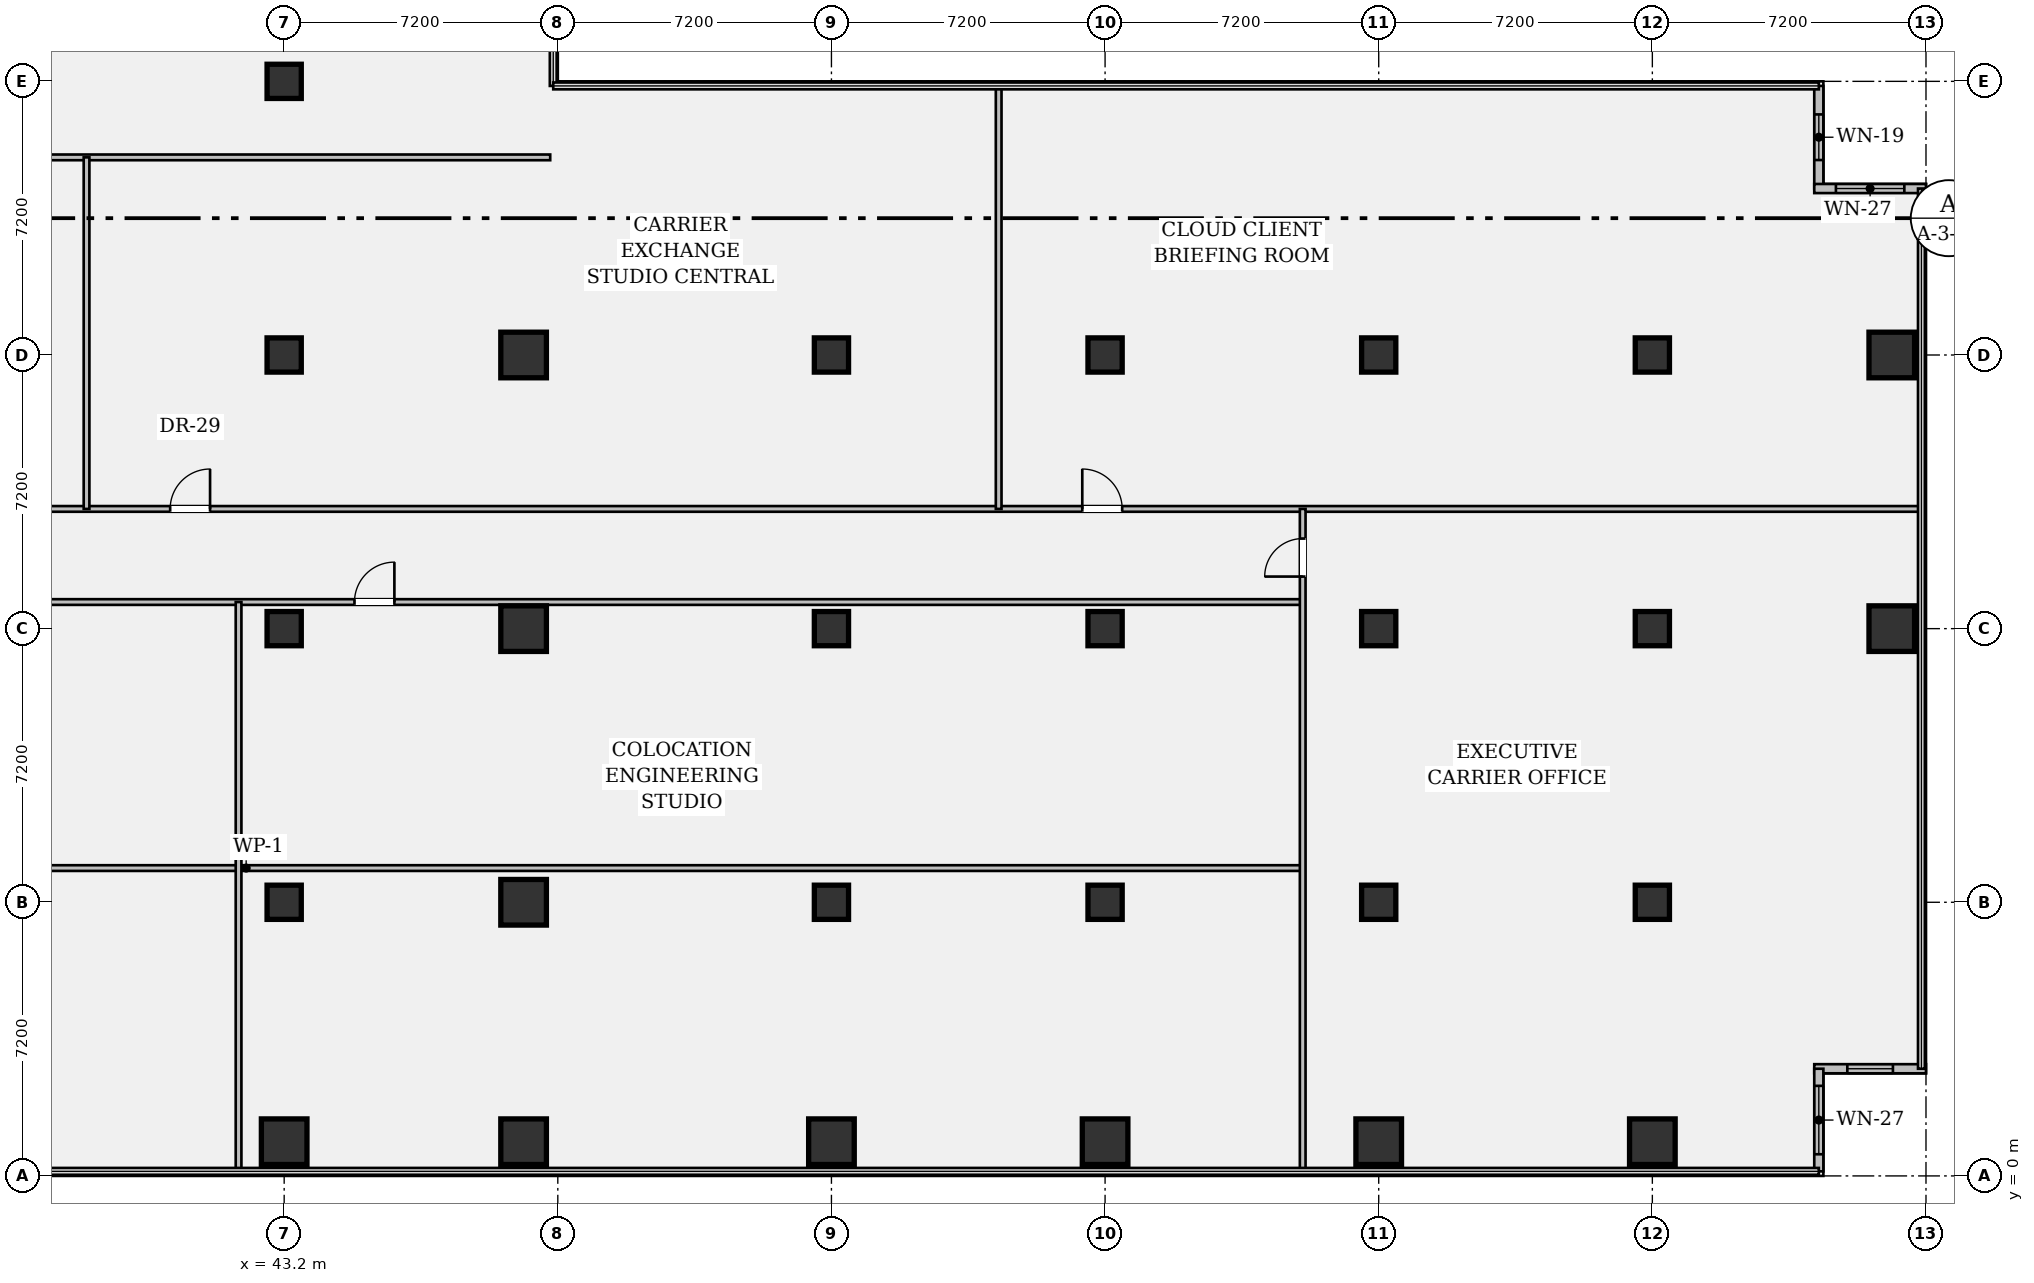
"""IFC4 building model, lengths in metres.
Left out: names, types, materials, properties, quantities, classifications, styles, units other than length and angle.
Written with IfcOpenShell. Run it as: python <this file> out.ifc"""

import sys

from ifc_helpers import new_model, si_unit, direction, frame, frame_2d, origin, origin_2d, place, context, subcontext, project, spatial, rectangle, hollow_rectangle, extrude, element, fill, save


model = new_model("IFC4")
c1 = context("Model", 3, precision=1e-05, world=origin(), true_north=direction((0.0, 1.0)))
c2 = subcontext(c1, "Body", "Model", "MODEL_VIEW")
j1 = project(units=[si_unit("LENGTHUNIT", "METRE"), si_unit("PLANEANGLEUNIT", "RADIAN")], contexts=[c1])
p1 = place(None, origin())
s1 = spatial("IfcSite", under=j1, at=p1, CompositionType="ELEMENT")
p2 = place(p1, origin())
s2 = spatial("IfcBuilding", under=s1, at=p2, CompositionType="ELEMENT")
p3 = place(p2, frame((0.0, 0.0, 9.45)))
s3 = spatial("IfcBuildingStorey", under=s2, at=p3, CompositionType="ELEMENT", Elevation=9.45)
p4 = place(p3, frame((43.2, 0.9, 0.0), z_axis=(0.0, 0.0, 1.0), x_axis=(1.0, 0.0, 0.0)))
e1 = element("IfcColumn", 1, at=p4, inside=s3, PredefinedType="COLUMN", context=c2, shape_type="SweptSolid", body=[
    extrude(hollow_rectangle(XDim=1.2, YDim=1.2, WallThickness=0.075, at=origin_2d()), origin(), (0.0, 0.0, 1.0), 3.9),
])
for number, where, z_axis, x_axis in (
    (2, (43.2, 7.2, 0.0), (0.0, 0.0, 1.0), (1.0, 0.0, 0.0)),
    (3, (43.2, 14.4, 0.0), (0.0, 0.0, 1.0), (1.0, 0.0, 0.0)),
    (4, (43.2, 21.6, 0.0), (0.0, 0.0, 1.0), (1.0, 0.0, 0.0)),
    (5, (43.2, 28.8, 0.0), (0.0, 0.0, 1.0), (1.0, 0.0, 0.0)),
):
    element("IfcColumn", number, at=place(p3, frame(where, z_axis=z_axis, x_axis=x_axis)), inside=s3, PredefinedType="COLUMN", context=c2, shape_type="SweptSolid", body=[
        extrude(rectangle(XDim=0.9, YDim=0.9, at=origin_2d()), origin(), (0.0, 0.0, 1.0), 3.9),
    ])
for number, where, z_axis, x_axis in (
    (6, (49.5, 0.9, 0.0), (0.0, 0.0, 1.0), (1.0, 0.0, 0.0)),
    (7, (49.5, 7.2, 0.0), (0.0, 0.0, 1.0), (1.0, 0.0, 0.0)),
    (8, (49.5, 14.4, 0.0), (0.0, 0.0, 1.0), (1.0, 0.0, 0.0)),
    (9, (49.5, 21.6, 0.0), (0.0, 0.0, 1.0), (1.0, 0.0, 0.0)),
    (10, (57.6, 0.9, 0.0), (0.0, 0.0, 1.0), (1.0, 0.0, 0.0)),
):
    element("IfcColumn", number, at=place(p3, frame(where, z_axis=z_axis, x_axis=x_axis)), inside=s3, PredefinedType="COLUMN", context=c2, shape_type="SweptSolid", body=[
        extrude(hollow_rectangle(XDim=1.2, YDim=1.2, WallThickness=0.075, at=origin_2d()), origin(), (0.0, 0.0, 1.0), 3.9),
    ])
for number, where, z_axis, x_axis in (
    (11, (57.6, 7.2, 0.0), (0.0, 0.0, 1.0), (1.0, 0.0, 0.0)),
    (12, (57.6, 14.4, 0.0), (0.0, 0.0, 1.0), (1.0, 0.0, 0.0)),
    (13, (57.6, 21.6, 0.0), (0.0, 0.0, 1.0), (1.0, 0.0, 0.0)),
):
    element("IfcColumn", number, at=place(p3, frame(where, z_axis=z_axis, x_axis=x_axis)), inside=s3, PredefinedType="COLUMN", context=c2, shape_type="SweptSolid", body=[
        extrude(rectangle(XDim=0.9, YDim=0.9, at=origin_2d()), origin(), (0.0, 0.0, 1.0), 3.9),
    ])
p5 = place(p3, frame((64.8, 0.9, 0.0), z_axis=(0.0, 0.0, 1.0), x_axis=(1.0, 0.0, 0.0)))
e14 = element("IfcColumn", 14, at=p5, inside=s3, PredefinedType="COLUMN", context=c2, shape_type="SweptSolid", body=[
    extrude(hollow_rectangle(XDim=1.2, YDim=1.2, WallThickness=0.075, at=origin_2d()), origin(), (0.0, 0.0, 1.0), 3.9),
])
for number, where, z_axis, x_axis in (
    (15, (64.8, 7.2, 0.0), (0.0, 0.0, 1.0), (1.0, 0.0, 0.0)),
    (16, (64.8, 14.4, 0.0), (0.0, 0.0, 1.0), (1.0, 0.0, 0.0)),
    (17, (64.8, 21.6, 0.0), (0.0, 0.0, 1.0), (1.0, 0.0, 0.0)),
):
    element("IfcColumn", number, at=place(p3, frame(where, z_axis=z_axis, x_axis=x_axis)), inside=s3, PredefinedType="COLUMN", context=c2, shape_type="SweptSolid", body=[
        extrude(rectangle(XDim=0.9, YDim=0.9, at=origin_2d()), origin(), (0.0, 0.0, 1.0), 3.9),
    ])
p6 = place(p3, frame((72.0, 0.9, 0.0), z_axis=(0.0, 0.0, 1.0), x_axis=(1.0, 0.0, 0.0)))
e18 = element("IfcColumn", 18, at=p6, inside=s3, PredefinedType="COLUMN", context=c2, shape_type="SweptSolid", body=[
    extrude(hollow_rectangle(XDim=1.2, YDim=1.2, WallThickness=0.075, at=origin_2d()), origin(), (0.0, 0.0, 1.0), 3.9),
])
for number, where, z_axis, x_axis in (
    (19, (72.0, 7.2, 0.0), (0.0, 0.0, 1.0), (1.0, 0.0, 0.0)),
    (20, (72.0, 14.4, 0.0), (0.0, 0.0, 1.0), (1.0, 0.0, 0.0)),
    (21, (72.0, 21.6, 0.0), (0.0, 0.0, 1.0), (1.0, 0.0, 0.0)),
):
    element("IfcColumn", number, at=place(p3, frame(where, z_axis=z_axis, x_axis=x_axis)), inside=s3, PredefinedType="COLUMN", context=c2, shape_type="SweptSolid", body=[
        extrude(rectangle(XDim=0.9, YDim=0.9, at=origin_2d()), origin(), (0.0, 0.0, 1.0), 3.9),
    ])
p7 = place(p3, frame((79.2, 0.9, 0.0), z_axis=(0.0, 0.0, 1.0), x_axis=(1.0, 0.0, 0.0)))
e22 = element("IfcColumn", 22, at=p7, inside=s3, PredefinedType="COLUMN", context=c2, shape_type="SweptSolid", body=[
    extrude(hollow_rectangle(XDim=1.2, YDim=1.2, WallThickness=0.075, at=origin_2d()), origin(), (0.0, 0.0, 1.0), 3.9),
])
for number, where, z_axis, x_axis in (
    (23, (79.2, 7.2, 0.0), (0.0, 0.0, 1.0), (1.0, 0.0, 0.0)),
    (24, (79.2, 14.4, 0.0), (0.0, 0.0, 1.0), (1.0, 0.0, 0.0)),
    (25, (79.2, 21.6, 0.0), (0.0, 0.0, 1.0), (1.0, 0.0, 0.0)),
):
    element("IfcColumn", number, at=place(p3, frame(where, z_axis=z_axis, x_axis=x_axis)), inside=s3, PredefinedType="COLUMN", context=c2, shape_type="SweptSolid", body=[
        extrude(rectangle(XDim=0.9, YDim=0.9, at=origin_2d()), origin(), (0.0, 0.0, 1.0), 3.9),
    ])
for number, where, z_axis, x_axis in (
    (26, (85.5, 14.4, 0.0), (0.0, 0.0, 1.0), (1.0, 0.0, 0.0)),
    (27, (85.5, 21.6, 0.0), (0.0, 0.0, 1.0), (1.0, 0.0, 0.0)),
):
    element("IfcColumn", number, at=place(p3, frame(where, z_axis=z_axis, x_axis=x_axis)), inside=s3, PredefinedType="COLUMN", context=c2, shape_type="SweptSolid", body=[
        extrude(hollow_rectangle(XDim=1.2, YDim=1.2, WallThickness=0.075, at=origin_2d()), origin(), (0.0, 0.0, 1.0), 3.9),
    ])
p8 = place(p3, frame((83.58, 28.68, 0.0), z_axis=(0.0, 0.0, 1.0), x_axis=(0.0, -1.0, 0.0)))
e28 = element("IfcWall", 28, at=p8, inside=s3, PredefinedType="STANDARD", context=c2, shape_type="SweptSolid", body=[
    extrude(rectangle(XDim=2.7, YDim=0.24, at=frame_2d((1.35, 0.0))), origin(), (0.0, 0.0, 1.0), 3.9),
])
p9 = place(p8, frame((0.75, 0.0, 0.95)))
e29 = element("IfcOpeningElement", 29, at=p9, cuts=e28, PredefinedType="OPENING", context=c2, shape_type="SweptSolid", body=[
    extrude(rectangle(XDim=1.2, YDim=1.8, at=frame_2d((0.6, 0.9))), frame((0.0, 0.132, 0.0), z_axis=(0.0, -1.0, 0.0), x_axis=(1.0, 0.0, 0.0)), (0.0, 0.0, 1.0), 0.264),
])
p10 = place(p3, frame((83.46, 25.98, 0.0), z_axis=(0.0, 0.0, 1.0), x_axis=(1.0, 0.0, 0.0)))
e30 = element("IfcWall", 30, at=p10, inside=s3, PredefinedType="STANDARD", context=c2, shape_type="SweptSolid", body=[
    extrude(rectangle(XDim=2.94, YDim=0.24, at=frame_2d((1.47, 0.0))), origin(), (0.0, 0.0, 1.0), 3.9),
])
p11 = place(p10, frame((0.57, 0.0, 0.95)))
e31 = element("IfcOpeningElement", 31, at=p11, cuts=e30, PredefinedType="OPENING", context=c2, shape_type="SweptSolid", body=[
    extrude(rectangle(XDim=1.8, YDim=1.35, at=frame_2d((0.9, 0.675))), frame((0.0, 0.132, 0.0), z_axis=(0.0, -1.0, 0.0), x_axis=(1.0, 0.0, 0.0)), (0.0, 0.0, 1.0), 0.264),
])
p12 = place(p3, frame((86.4, 2.82, 0.0), z_axis=(0.0, 0.0, 1.0), x_axis=(-1.0, 0.0, 0.0)))
e32 = element("IfcWall", 32, at=p12, inside=s3, PredefinedType="STANDARD", context=c2, shape_type="SweptSolid", body=[
    extrude(rectangle(XDim=2.94, YDim=0.24, at=frame_2d((1.47, 0.0))), origin(), (0.0, 0.0, 1.0), 3.9),
])
p13 = place(p12, frame((0.87, 0.0, 0.95)))
e33 = element("IfcOpeningElement", 33, at=p13, cuts=e32, PredefinedType="OPENING", context=c2, shape_type="SweptSolid", body=[
    extrude(rectangle(XDim=1.2, YDim=1.8, at=frame_2d((0.6, 0.9))), frame((0.0, 0.132, 0.0), z_axis=(0.0, -1.0, 0.0), x_axis=(1.0, 0.0, 0.0)), (0.0, 0.0, 1.0), 0.264),
])
p14 = place(p3, frame((83.58, 2.82, 0.0), z_axis=(0.0, 0.0, 1.0), x_axis=(0.0, -1.0, 0.0)))
e34 = element("IfcWall", 34, at=p14, inside=s3, PredefinedType="STANDARD", context=c2, shape_type="SweptSolid", body=[
    extrude(rectangle(XDim=2.7, YDim=0.24, at=frame_2d((1.35, 0.0))), origin(), (0.0, 0.0, 1.0), 3.9),
])
p15 = place(p14, frame((0.45, 0.0, 0.95)))
e35 = element("IfcOpeningElement", 35, at=p15, cuts=e34, PredefinedType="OPENING", context=c2, shape_type="SweptSolid", body=[
    extrude(rectangle(XDim=1.8, YDim=1.35, at=frame_2d((0.9, 0.675))), frame((0.0, 0.132, 0.0), z_axis=(0.0, -1.0, 0.0), x_axis=(1.0, 0.0, 0.0)), (0.0, 0.0, 1.0), 0.264),
])
p16 = place(p3, frame((14.4, 8.1, 0.0), z_axis=(0.0, 0.0, 1.0), x_axis=(1.0, 0.0, 0.0)))
e36 = element("IfcWall", 36, at=p16, inside=s3, PredefinedType="PARTITIONING", context=c2, shape_type="SweptSolid", body=[
    extrude(rectangle(XDim=55.6, YDim=0.15, at=frame_2d((27.8, 0.0))), origin(), (0.0, 0.0, 1.0), 2.938),
])
p17 = place(p16, frame((1.1, 0.0, 0.0)))
e37 = element("IfcOpeningElement", 37, at=p17, cuts=e36, PredefinedType="OPENING", context=c2, shape_type="SweptSolid", body=[
    extrude(rectangle(XDim=1.0, YDim=2.15, at=frame_2d((0.5, 1.075))), frame((0.0, 0.087, 0.0), z_axis=(0.0, -1.0, 0.0), x_axis=(1.0, 0.0, 0.0)), (0.0, 0.0, 1.0), 0.174),
])
p18 = place(p3, frame((17.45, 15.1, 0.0), z_axis=(0.0, 0.0, 1.0), x_axis=(1.0, 0.0, 0.0)))
e38 = element("IfcWall", 38, at=p18, inside=s3, PredefinedType="PARTITIONING", context=c2, shape_type="SweptSolid", body=[
    extrude(rectangle(XDim=52.55, YDim=0.15, at=frame_2d((26.275, 0.0))), origin(), (0.0, 0.0, 1.0), 2.938),
])
p19 = place(p18, frame((5.2, 0.0, 0.0)))
e39 = element("IfcOpeningElement", 39, at=p19, cuts=e38, PredefinedType="OPENING", context=c2, shape_type="SweptSolid", body=[
    extrude(rectangle(XDim=1.05, YDim=2.15, at=frame_2d((0.525, 1.075))), frame((0.0, 0.087, 0.0), z_axis=(0.0, -1.0, 0.0), x_axis=(1.0, 0.0, 0.0)), (0.0, 0.0, 1.0), 0.174),
])
p20 = place(p18, frame((27.6, 0.0, 0.0)))
e40 = element("IfcOpeningElement", 40, at=p20, cuts=e38, PredefinedType="OPENING", context=c2, shape_type="SweptSolid", body=[
    extrude(rectangle(XDim=1.05, YDim=2.15, at=frame_2d((0.525, 1.075))), frame((0.0, 0.087, 0.0), z_axis=(0.0, -1.0, 0.0), x_axis=(1.0, 0.0, 0.0)), (0.0, 0.0, 1.0), 0.174),
])
p21 = place(p3, frame((17.45, 17.55, 0.0), z_axis=(0.0, 0.0, 1.0), x_axis=(1.0, 0.0, 0.0)))
e41 = element("IfcWall", 41, at=p21, inside=s3, PredefinedType="PARTITIONING", context=c2, shape_type="SweptSolid", body=[
    extrude(rectangle(XDim=68.83, YDim=0.15, at=frame_2d((34.415, 0.0))), origin(), (0.0, 0.0, 1.0), 2.938),
])
p22 = place(p21, frame((2.4, 0.0, 0.0)))
e42 = element("IfcOpeningElement", 42, at=p22, cuts=e41, PredefinedType="OPENING", context=c2, shape_type="SweptSolid", body=[
    extrude(rectangle(XDim=1.05, YDim=2.15, at=frame_2d((0.525, 1.075))), frame((0.0, 0.087, 0.0), z_axis=(0.0, -1.0, 0.0), x_axis=(1.0, 0.0, 0.0)), (0.0, 0.0, 1.0), 0.174),
])
p23 = place(p21, frame((22.75, 0.0, 0.0)))
e43 = element("IfcOpeningElement", 43, at=p23, cuts=e41, PredefinedType="OPENING", context=c2, shape_type="SweptSolid", body=[
    extrude(rectangle(XDim=1.05, YDim=2.15, at=frame_2d((0.525, 1.075))), frame((0.0, 0.087, 0.0), z_axis=(0.0, -1.0, 0.0), x_axis=(1.0, 0.0, 0.0)), (0.0, 0.0, 1.0), 0.174),
])
p24 = place(p21, frame((46.75, 0.0, 0.0)))
e44 = element("IfcOpeningElement", 44, at=p24, cuts=e41, PredefinedType="OPENING", context=c2, shape_type="SweptSolid", body=[
    extrude(rectangle(XDim=1.05, YDim=2.15, at=frame_2d((0.525, 1.075))), frame((0.0, 0.087, 0.0), z_axis=(0.0, -1.0, 0.0), x_axis=(1.0, 0.0, 0.0)), (0.0, 0.0, 1.0), 0.174),
])
p25 = place(p3, frame((70.0, 0.12, 0.0), z_axis=(0.0, 0.0, 1.0), x_axis=(0.0, 1.0, 0.0)))
e45 = element("IfcWall", 45, at=p25, inside=s3, PredefinedType="PARTITIONING", context=c2, shape_type="SweptSolid", body=[
    extrude(rectangle(XDim=17.43, YDim=0.15, at=frame_2d((8.715, 0.0))), origin(), (0.0, 0.0, 1.0), 2.938),
])
p26 = place(p25, frame((15.65, 0.0, 0.0)))
e46 = element("IfcOpeningElement", 46, at=p26, cuts=e45, PredefinedType="OPENING", context=c2, shape_type="SweptSolid", body=[
    extrude(rectangle(XDim=1.0, YDim=2.15, at=frame_2d((0.5, 1.075))), frame((0.0, 0.087, 0.0), z_axis=(0.0, -1.0, 0.0), x_axis=(1.0, 0.0, 0.0)), (0.0, 0.0, 1.0), 0.174),
])
p27 = place(p3, frame((17.45, 26.8, 0.0), z_axis=(0.0, 0.0, 1.0), x_axis=(1.0, 0.0, 0.0)))
e47 = element("IfcWall", 47, at=p27, inside=s3, PredefinedType="PARTITIONING", context=c2, shape_type="SweptSolid", body=[
    extrude(rectangle(XDim=32.75, YDim=0.15, at=frame_2d((16.375, 0.0))), origin(), (0.0, 0.0, 1.0), 2.938),
])
p28 = place(p3, frame((38.0, 17.55, 0.0), z_axis=(0.0, 0.0, 1.0), x_axis=(0.0, 1.0, 0.0)))
e48 = element("IfcWall", 48, at=p28, inside=s3, PredefinedType="PARTITIONING", context=c2, shape_type="SweptSolid", body=[
    extrude(rectangle(XDim=9.25, YDim=0.15, at=frame_2d((4.625, 0.0))), origin(), (0.0, 0.0, 1.0), 2.938),
])
p29 = place(p3, frame((62.0, 17.55, 0.0), z_axis=(0.0, 0.0, 1.0), x_axis=(0.0, 1.0, 0.0)))
e49 = element("IfcWall", 49, at=p29, inside=s3, PredefinedType="PARTITIONING", context=c2, shape_type="SweptSolid", body=[
    extrude(rectangle(XDim=11.15, YDim=0.15, at=frame_2d((5.575, 0.0))), origin(), (0.0, 0.0, 1.0), 2.938),
])
p30 = place(p3, frame((42.0, 0.12, 0.0), z_axis=(0.0, 0.0, 1.0), x_axis=(0.0, 1.0, 0.0)))
e50 = element("IfcWall", 50, at=p30, inside=s3, PredefinedType="PARTITIONING", context=c2, shape_type="SweptSolid", body=[
    extrude(rectangle(XDim=14.98, YDim=0.15, at=frame_2d((7.49, 0.0))), origin(), (0.0, 0.0, 1.0), 2.938),
])
p31 = place(p9, origin())
e51 = element("IfcWindow", 51, at=p31, inside=s3, PartitioningType="SINGLE_PANEL", PredefinedType="WINDOW", context=c2, shape_type="SweptSolid", body=[
    extrude(rectangle(XDim=1.2, YDim=1.8, at=frame_2d((0.6, 0.9))), frame((0.0, 0.03, 0.0), z_axis=(0.0, -1.0, 0.0), x_axis=(1.0, 0.0, 0.0)), (0.0, 0.0, 1.0), 0.06),
])
fill(e29, e51)
p32 = place(p11, origin())
e52 = element("IfcWindow", 52, at=p32, inside=s3, PartitioningType="SINGLE_PANEL", PredefinedType="WINDOW", context=c2, shape_type="SweptSolid", body=[
    extrude(rectangle(XDim=1.8, YDim=1.35, at=frame_2d((0.9, 0.675))), frame((0.0, 0.03, 0.0), z_axis=(0.0, -1.0, 0.0), x_axis=(1.0, 0.0, 0.0)), (0.0, 0.0, 1.0), 0.06),
])
fill(e31, e52)
p33 = place(p13, origin())
e53 = element("IfcWindow", 53, at=p33, inside=s3, PartitioningType="SINGLE_PANEL", PredefinedType="WINDOW", context=c2, shape_type="SweptSolid", body=[
    extrude(rectangle(XDim=1.2, YDim=1.8, at=frame_2d((0.6, 0.9))), frame((0.0, 0.03, 0.0), z_axis=(0.0, -1.0, 0.0), x_axis=(1.0, 0.0, 0.0)), (0.0, 0.0, 1.0), 0.06),
])
fill(e33, e53)
p34 = place(p15, origin())
e54 = element("IfcWindow", 54, at=p34, inside=s3, PartitioningType="SINGLE_PANEL", PredefinedType="WINDOW", context=c2, shape_type="SweptSolid", body=[
    extrude(rectangle(XDim=1.8, YDim=1.35, at=frame_2d((0.9, 0.675))), frame((0.0, 0.03, 0.0), z_axis=(0.0, -1.0, 0.0), x_axis=(1.0, 0.0, 0.0)), (0.0, 0.0, 1.0), 0.06),
])
fill(e35, e54)
p35 = place(p23, origin())
e55 = element("IfcDoor", 55, at=p35, inside=s3, OperationType="SINGLE_SWING_RIGHT", PredefinedType="DOOR", context=c2, shape_type="SweptSolid", body=[
    extrude(rectangle(XDim=1.05, YDim=2.15, at=frame_2d((0.525, 1.075))), frame((0.0, 0.025, 0.0), z_axis=(0.0, -1.0, 0.0), x_axis=(1.0, 0.0, 0.0)), (0.0, 0.0, 1.0), 0.05),
])
fill(e43, e55)
p36 = place(p24, origin())
e56 = element("IfcDoor", 56, at=p36, inside=s3, OperationType="SINGLE_SWING_LEFT", PredefinedType="DOOR", context=c2, shape_type="SweptSolid", body=[
    extrude(rectangle(XDim=1.05, YDim=2.15, at=frame_2d((0.525, 1.075))), frame((0.0, 0.025, 0.0), z_axis=(0.0, -1.0, 0.0), x_axis=(1.0, 0.0, 0.0)), (0.0, 0.0, 1.0), 0.05),
])
fill(e44, e56)
p37 = place(p20, origin())
e57 = element("IfcDoor", 57, at=p37, inside=s3, OperationType="SINGLE_SWING_RIGHT", PredefinedType="DOOR", context=c2, shape_type="SweptSolid", body=[
    extrude(rectangle(XDim=1.05, YDim=2.15, at=frame_2d((0.525, 1.075))), frame((0.0, 0.025, 0.0), z_axis=(0.0, -1.0, 0.0), x_axis=(1.0, 0.0, 0.0)), (0.0, 0.0, 1.0), 0.05),
])
fill(e40, e57)
p38 = place(p26, origin())
e58 = element("IfcDoor", 58, at=p38, inside=s3, OperationType="SINGLE_SWING_LEFT", PredefinedType="DOOR", context=c2, shape_type="SweptSolid", body=[
    extrude(rectangle(XDim=1.0, YDim=2.15, at=frame_2d((0.5, 1.075))), frame((0.0, 0.025, 0.0), z_axis=(0.0, -1.0, 0.0), x_axis=(1.0, 0.0, 0.0)), (0.0, 0.0, 1.0), 0.05),
])
fill(e46, e58)
save(model, sys.argv[1])
